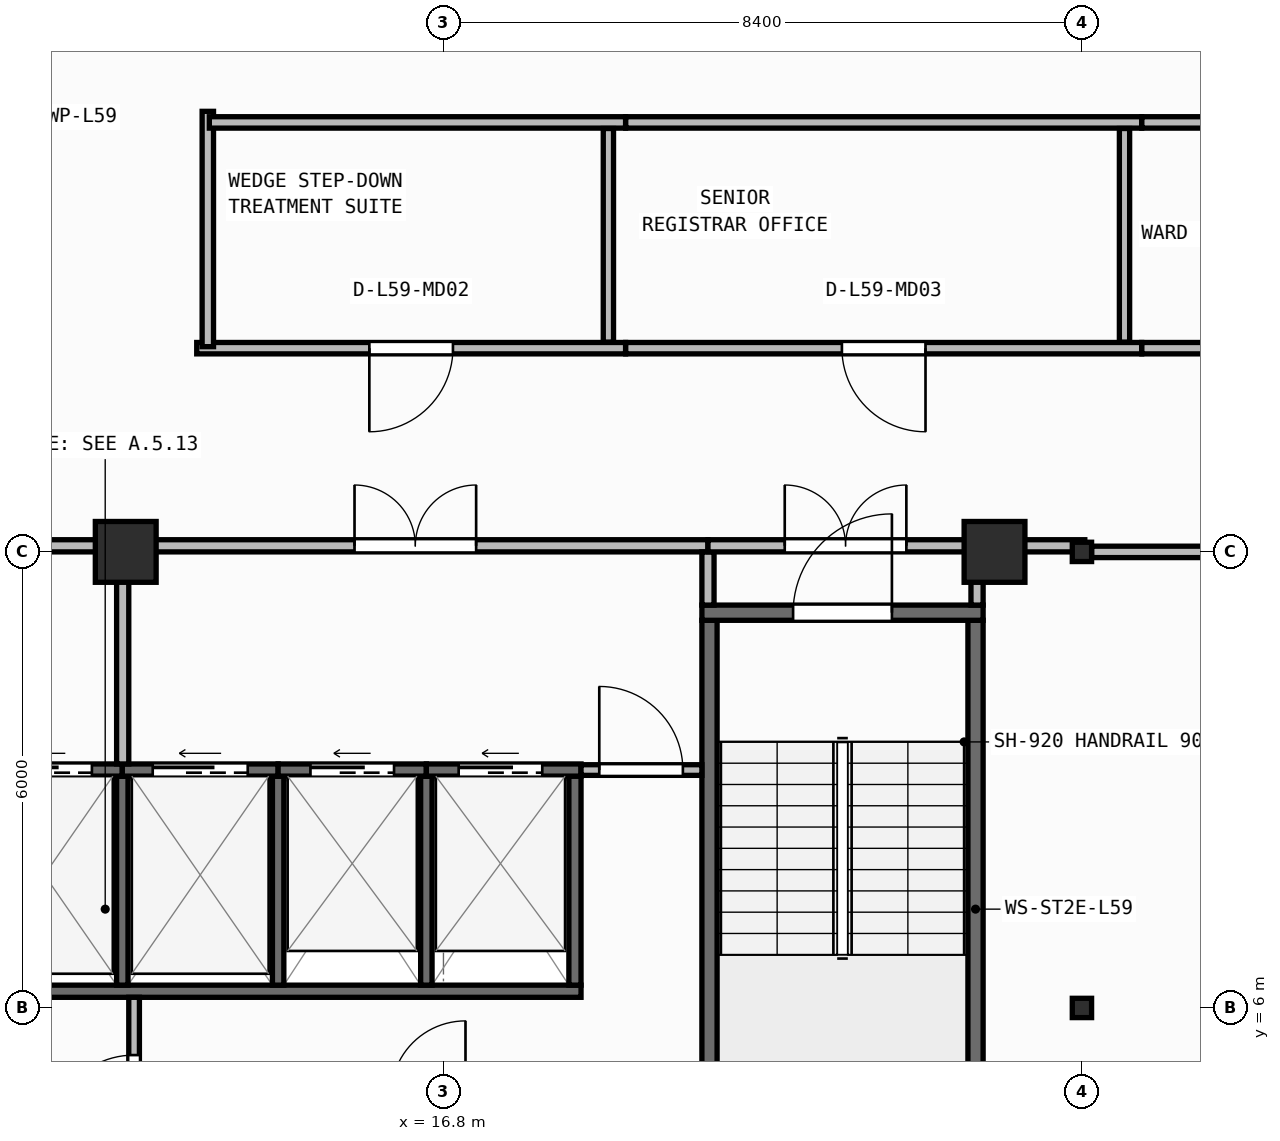
"""IFC4 building model, lengths in metres.
Left out: names, types, materials, properties, quantities, classifications, styles, units other than length and angle.
Written with IfcOpenShell. Run it as: python <this file> out.ifc"""

import sys

from ifc_helpers import new_model, si_unit, direction, frame, frame_2d, origin, origin_2d, place, context, subcontext, project, spatial, rectangle, i_section, extrude, element, fill, save


model = new_model("IFC4")
c1 = context("Model", 3, precision=1e-05, world=origin(), true_north=direction((0.0, 1.0)))
c2 = subcontext(c1, "Body", "Model", "MODEL_VIEW")
j1 = project(units=[si_unit("LENGTHUNIT", "METRE"), si_unit("PLANEANGLEUNIT", "RADIAN")], contexts=[c1])
p1 = place(None, origin())
s1 = spatial("IfcSite", under=j1, at=p1, CompositionType="ELEMENT")
p2 = place(p1, origin())
s2 = spatial("IfcBuilding", under=s1, at=p2, CompositionType="ELEMENT")
p3 = place(p2, frame((0.0, 0.0, 240.75)))
s3 = spatial("IfcBuildingStorey", under=s2, at=p3, CompositionType="ELEMENT", Elevation=240.75)
p4 = place(p3, frame((25.2, 6.0, 0.0), z_axis=(0.0, 0.0, 1.0), x_axis=(1.0, 0.0, 0.0)))
e1 = element("IfcColumn", 1, at=p4, inside=s3, PredefinedType="COLUMN", context=c2, shape_type="SweptSolid", body=[
    extrude(i_section(OverallWidth=0.254, OverallDepth=0.254, WebThickness=0.009, FlangeThickness=0.014, FilletRadius=0.013, at=origin_2d()), origin(), (0.0, 0.0, 1.0), 3.95),
])
for number, where, z_axis, x_axis in (
    (2, (12.62, 12.0, 0.0), (0.0, 0.0, 1.0), (1.0, 0.0, 0.0)),
    (3, (24.05, 12.0, 0.0), (0.0, 0.0, 1.0), (1.0, 0.0, 0.0)),
):
    element("IfcColumn", number, at=place(p3, frame(where, z_axis=z_axis, x_axis=x_axis)), inside=s3, PredefinedType="COLUMN", context=c2, shape_type="SweptSolid", body=[
        extrude(rectangle(XDim=0.8, YDim=0.8, at=origin_2d()), origin(), (0.0, 0.0, 1.0), 3.95),
    ])
p5 = place(p3, frame((25.2, 12.0, 0.0), z_axis=(0.0, 0.0, 1.0), x_axis=(1.0, 0.0, 0.0)))
e4 = element("IfcColumn", 4, at=p5, inside=s3, PredefinedType="COLUMN", context=c2, shape_type="SweptSolid", body=[
    extrude(i_section(OverallWidth=0.254, OverallDepth=0.254, WebThickness=0.009, FlangeThickness=0.014, FilletRadius=0.013, at=origin_2d()), origin(), (0.0, 0.0, 1.0), 3.95),
])
for number, where, z_axis, x_axis in (
    (5, (20.3, 3.5, 0.0), (0.0, 0.0, 1.0), (0.0, 1.0, 0.0)),
    (6, (23.8, 3.5, 0.0), (0.0, 0.0, 1.0), (0.0, 1.0, 0.0)),
):
    element("IfcWall", number, at=place(p3, frame(where, z_axis=z_axis, x_axis=x_axis)), inside=s3, PredefinedType="SHEAR", context=c2, shape_type="SweptSolid", body=[
        extrude(rectangle(XDim=7.6, YDim=0.2, at=frame_2d((3.8, 0.0))), origin(), (0.0, 0.0, 1.0), 3.71),
    ])
p6 = place(p3, frame((20.2, 11.2, 0.0), z_axis=(0.0, 0.0, 1.0), x_axis=(1.0, 0.0, 0.0)))
e7 = element("IfcWall", 7, at=p6, inside=s3, PredefinedType="SHEAR", context=c2, shape_type="SweptSolid", body=[
    extrude(rectangle(XDim=3.7, YDim=0.2, at=frame_2d((1.85, 0.0))), origin(), (0.0, 0.0, 1.0), 3.71),
])
p7 = place(p6, frame((1.2, 0.0, 0.0)))
e8 = element("IfcOpeningElement", 8, at=p7, cuts=e7, PredefinedType="OPENING", context=c2, shape_type="SweptSolid", body=[
    extrude(rectangle(XDim=1.3, YDim=2.15, at=frame_2d((0.65, 1.075))), frame((0.0, 0.11, 0.0), z_axis=(0.0, -1.0, 0.0), x_axis=(1.0, 0.0, 0.0)), (0.0, 0.0, 1.0), 0.22),
])
p8 = place(p3, frame((6.5, 6.22, 0.0), z_axis=(0.0, 0.0, 1.0), x_axis=(1.0, 0.0, 0.0)))
e9 = element("IfcWall", 9, at=p8, inside=s3, PredefinedType="SHEAR", context=c2, shape_type="SweptSolid", body=[
    extrude(rectangle(XDim=12.11, YDim=0.16, at=frame_2d((6.055, 0.0))), origin(), (0.0, 0.0, 1.0), 3.71),
])
p9 = place(p3, frame((18.53, 6.3, 0.0), z_axis=(0.0, 0.0, 1.0), x_axis=(0.0, 1.0, 0.0)))
e10 = element("IfcWall", 10, at=p9, inside=s3, PredefinedType="SHEAR", context=c2, shape_type="SweptSolid", body=[
    extrude(rectangle(XDim=2.75, YDim=0.16, at=frame_2d((1.375, 0.0))), origin(), (0.0, 0.0, 1.0), 3.71),
])
for number, where, z_axis, x_axis in (
    (11, (12.575, 6.3, 0.0), (0.0, 0.0, 1.0), (0.0, 1.0, 0.0)),
    (12, (14.625, 6.3, 0.0), (0.0, 0.0, 1.0), (0.0, 1.0, 0.0)),
    (13, (16.575, 6.3, 0.0), (0.0, 0.0, 1.0), (0.0, 1.0, 0.0)),
):
    element("IfcWall", number, at=place(p3, frame(where, z_axis=z_axis, x_axis=x_axis)), inside=s3, PredefinedType="SHEAR", context=c2, shape_type="SweptSolid", body=[
        extrude(rectangle(XDim=2.75, YDim=0.15, at=frame_2d((1.375, 0.0))), origin(), (0.0, 0.0, 1.0), 3.71),
    ])
p10 = place(p3, frame((10.525, 9.13, 0.0), z_axis=(0.0, 0.0, 1.0), x_axis=(1.0, 0.0, 0.0)))
e14 = element("IfcWall", 14, at=p10, inside=s3, PredefinedType="SHEAR", context=c2, shape_type="SweptSolid", body=[
    extrude(rectangle(XDim=2.05, YDim=0.16, at=frame_2d((1.025, 0.0))), origin(), (0.0, 0.0, 1.0), 3.71),
])
p11 = place(p10, frame((0.4, 0.0, 0.0)))
e15 = element("IfcOpeningElement", 15, at=p11, cuts=e14, PredefinedType="OPENING", context=c2, shape_type="SweptSolid", body=[
    extrude(rectangle(XDim=1.25, YDim=2.15, at=frame_2d((0.625, 1.075))), frame((0.0, 0.09, 0.0), z_axis=(0.0, -1.0, 0.0), x_axis=(1.0, 0.0, 0.0)), (0.0, 0.0, 1.0), 0.18),
])
p12 = place(p3, frame((12.575, 9.13, 0.0), z_axis=(0.0, 0.0, 1.0), x_axis=(1.0, 0.0, 0.0)))
e16 = element("IfcWall", 16, at=p12, inside=s3, PredefinedType="SHEAR", context=c2, shape_type="SweptSolid", body=[
    extrude(rectangle(XDim=2.05, YDim=0.16, at=frame_2d((1.025, 0.0))), origin(), (0.0, 0.0, 1.0), 3.71),
])
p13 = place(p12, frame((0.4, 0.0, 0.0)))
e17 = element("IfcOpeningElement", 17, at=p13, cuts=e16, PredefinedType="OPENING", context=c2, shape_type="SweptSolid", body=[
    extrude(rectangle(XDim=1.25, YDim=2.15, at=frame_2d((0.625, 1.075))), frame((0.0, 0.09, 0.0), z_axis=(0.0, -1.0, 0.0), x_axis=(1.0, 0.0, 0.0)), (0.0, 0.0, 1.0), 0.18),
])
p14 = place(p3, frame((14.625, 9.13, 0.0), z_axis=(0.0, 0.0, 1.0), x_axis=(1.0, 0.0, 0.0)))
e18 = element("IfcWall", 18, at=p14, inside=s3, PredefinedType="SHEAR", context=c2, shape_type="SweptSolid", body=[
    extrude(rectangle(XDim=1.95, YDim=0.16, at=frame_2d((0.975, 0.0))), origin(), (0.0, 0.0, 1.0), 3.71),
])
p15 = place(p14, frame((0.425, 0.0, 0.0)))
e19 = element("IfcOpeningElement", 19, at=p15, cuts=e18, PredefinedType="OPENING", context=c2, shape_type="SweptSolid", body=[
    extrude(rectangle(XDim=1.1, YDim=2.15, at=frame_2d((0.55, 1.075))), frame((0.0, 0.09, 0.0), z_axis=(0.0, -1.0, 0.0), x_axis=(1.0, 0.0, 0.0)), (0.0, 0.0, 1.0), 0.18),
])
p16 = place(p3, frame((16.575, 9.13, 0.0), z_axis=(0.0, 0.0, 1.0), x_axis=(1.0, 0.0, 0.0)))
e20 = element("IfcWall", 20, at=p16, inside=s3, PredefinedType="SHEAR", context=c2, shape_type="SweptSolid", body=[
    extrude(rectangle(XDim=2.035, YDim=0.16, at=frame_2d((1.018, 0.0))), origin(), (0.0, 0.0, 1.0), 3.71),
])
p17 = place(p16, frame((0.425, 0.0, 0.0)))
e21 = element("IfcOpeningElement", 21, at=p17, cuts=e20, PredefinedType="OPENING", context=c2, shape_type="SweptSolid", body=[
    extrude(rectangle(XDim=1.1, YDim=2.15, at=frame_2d((0.55, 1.075))), frame((0.0, 0.09, 0.0), z_axis=(0.0, -1.0, 0.0), x_axis=(1.0, 0.0, 0.0)), (0.0, 0.0, 1.0), 0.18),
])
p18 = place(p3, frame((12.73, 3.52, 0.0), z_axis=(0.0, 0.0, 1.0), x_axis=(0.0, 1.0, 0.0)))
e22 = element("IfcWall", 22, at=p18, inside=s3, PredefinedType="PARTITIONING", context=c2, shape_type="SweptSolid", body=[
    extrude(rectangle(XDim=2.62, YDim=0.14, at=frame_2d((1.31, 0.0))), origin(), (0.0, 0.0, 1.0), 3.71),
])
p19 = place(p18, frame((0.76, 0.0, 0.0)))
e23 = element("IfcOpeningElement", 23, at=p19, cuts=e22, PredefinedType="OPENING", context=c2, shape_type="SweptSolid", body=[
    extrude(rectangle(XDim=1.1, YDim=2.1, at=frame_2d((0.55, 1.05))), frame((0.0, 0.08, 0.0), z_axis=(0.0, -1.0, 0.0), x_axis=(1.0, 0.0, 0.0)), (0.0, 0.0, 1.0), 0.16),
])
p20 = place(p3, frame((18.61, 9.13, 0.0), z_axis=(0.0, 0.0, 1.0), x_axis=(1.0, 0.0, 0.0)))
e24 = element("IfcWall", 24, at=p20, inside=s3, PredefinedType="PARTITIONING", context=c2, shape_type="SweptSolid", body=[
    extrude(rectangle(XDim=1.59, YDim=0.14, at=frame_2d((0.795, 0.0))), origin(), (0.0, 0.0, 1.0), 3.71),
])
p21 = place(p20, frame((0.24, 0.0, 0.0)))
e25 = element("IfcOpeningElement", 25, at=p21, cuts=e24, PredefinedType="OPENING", context=c2, shape_type="SweptSolid", body=[
    extrude(rectangle(XDim=1.1, YDim=2.1, at=frame_2d((0.55, 1.05))), frame((0.0, 0.08, 0.0), z_axis=(0.0, -1.0, 0.0), x_axis=(1.0, 0.0, 0.0)), (0.0, 0.0, 1.0), 0.16),
])
p22 = place(p3, frame((6.4, 12.08, 0.0), z_axis=(0.0, 0.0, 1.0), x_axis=(1.0, 0.0, 0.0)))
e26 = element("IfcWall", 26, at=p22, inside=s3, PredefinedType="PARTITIONING", context=c2, shape_type="SweptSolid", body=[
    extrude(rectangle(XDim=6.18, YDim=0.16, at=frame_2d((3.09, 0.0))), origin(), (0.0, 0.0, 1.0), 3.157),
])
p23 = place(p22, frame((2.29, 0.0, 0.0)))
e27 = element("IfcOpeningElement", 27, at=p23, cuts=e26, PredefinedType="OPENING", context=c2, shape_type="SweptSolid", body=[
    extrude(rectangle(XDim=1.6, YDim=2.05, at=frame_2d((0.8, 1.025))), frame((0.0, 0.09, 0.0), z_axis=(0.0, -1.0, 0.0), x_axis=(1.0, 0.0, 0.0)), (0.0, 0.0, 1.0), 0.18),
])
p24 = place(p3, frame((12.58, 9.21, 0.0), z_axis=(0.0, 0.0, 1.0), x_axis=(0.0, 1.0, 0.0)))
e28 = element("IfcWall", 28, at=p24, inside=s3, PredefinedType="PARTITIONING", context=c2, shape_type="SweptSolid", body=[
    extrude(rectangle(XDim=2.79, YDim=0.16, at=frame_2d((1.395, 0.0))), origin(), (0.0, 0.0, 1.0), 3.71),
])
p25 = place(p3, frame((12.58, 12.08, 0.0), z_axis=(0.0, 0.0, 1.0), x_axis=(1.0, 0.0, 0.0)))
e29 = element("IfcWall", 29, at=p25, inside=s3, PredefinedType="PARTITIONING", context=c2, shape_type="SweptSolid", body=[
    extrude(rectangle(XDim=7.7, YDim=0.16, at=frame_2d((3.85, 0.0))), origin(), (0.0, 0.0, 1.0), 3.157),
])
p26 = place(p25, frame((3.05, 0.0, 0.0)))
e30 = element("IfcOpeningElement", 30, at=p26, cuts=e29, PredefinedType="OPENING", context=c2, shape_type="SweptSolid", body=[
    extrude(rectangle(XDim=1.6, YDim=2.05, at=frame_2d((0.8, 1.025))), frame((0.0, 0.09, 0.0), z_axis=(0.0, -1.0, 0.0), x_axis=(1.0, 0.0, 0.0)), (0.0, 0.0, 1.0), 0.18),
])
p27 = place(p3, frame((20.28, 11.3, 0.0), z_axis=(0.0, 0.0, 1.0), x_axis=(0.0, 1.0, 0.0)))
e31 = element("IfcWall", 31, at=p27, inside=s3, PredefinedType="PARTITIONING", context=c2, shape_type="SweptSolid", body=[
    extrude(rectangle(XDim=0.7, YDim=0.16, at=frame_2d((0.35, 0.0))), origin(), (0.0, 0.0, 1.0), 3.71),
])
p28 = place(p3, frame((20.28, 12.08, 0.0), z_axis=(0.0, 0.0, 1.0), x_axis=(1.0, 0.0, 0.0)))
e32 = element("IfcWall", 32, at=p28, inside=s3, PredefinedType="PARTITIONING", context=c2, shape_type="SweptSolid", body=[
    extrude(rectangle(XDim=3.62, YDim=0.16, at=frame_2d((1.81, 0.0))), origin(), (0.0, 0.0, 1.0), 3.157),
])
p29 = place(p28, frame((1.01, 0.0, 0.0)))
e33 = element("IfcOpeningElement", 33, at=p29, cuts=e32, PredefinedType="OPENING", context=c2, shape_type="SweptSolid", body=[
    extrude(rectangle(XDim=1.6, YDim=2.05, at=frame_2d((0.8, 1.025))), frame((0.0, 0.09, 0.0), z_axis=(0.0, -1.0, 0.0), x_axis=(1.0, 0.0, 0.0)), (0.0, 0.0, 1.0), 0.18),
])
p30 = place(p3, frame((23.82, 11.3, 0.0), z_axis=(0.0, 0.0, 1.0), x_axis=(0.0, 1.0, 0.0)))
e34 = element("IfcWall", 34, at=p30, inside=s3, PredefinedType="PARTITIONING", context=c2, shape_type="SweptSolid", body=[
    extrude(rectangle(XDim=0.7, YDim=0.16, at=frame_2d((0.35, 0.0))), origin(), (0.0, 0.0, 1.0), 3.71),
])
p31 = place(p3, frame((31.35, 12.0, 0.0), z_axis=(0.0, 0.0, 1.0), x_axis=(-1.0, 0.0, 0.0)))
e35 = element("IfcWall", 35, at=p31, inside=s3, PredefinedType="PARTITIONING", context=c2, shape_type="SweptSolid", body=[
    extrude(rectangle(XDim=6.023, YDim=0.15, at=frame_2d((3.012, 0.0))), origin(), (0.0, 0.0, 1.0), 3.157),
])
p32 = place(p31, frame((1.444, 0.0, 0.0)))
e36 = element("IfcOpeningElement", 36, at=p32, cuts=e35, PredefinedType="OPENING", context=c2, shape_type="SweptSolid", body=[
    extrude(rectangle(XDim=1.1, YDim=2.1, at=frame_2d((0.55, 1.05))), frame((0.0, 0.085, 0.0), z_axis=(0.0, -1.0, 0.0), x_axis=(1.0, 0.0, 0.0)), (0.0, 0.0, 1.0), 0.17),
])
p33 = place(p3, frame((19.196, 14.68, 0.0), z_axis=(0.0, 0.0, 1.0), x_axis=(-1.0, 0.0, 0.0)))
e37 = element("IfcWall", 37, at=p33, inside=s3, PredefinedType="PARTITIONING", context=c2, shape_type="SweptSolid", body=[
    extrude(rectangle(XDim=5.642, YDim=0.15, at=frame_2d((2.821, 0.0))), origin(), (0.0, 0.0, 1.0), 3.71),
])
p34 = place(p33, frame((2.271, 0.0, 0.0)))
e38 = element("IfcOpeningElement", 38, at=p34, cuts=e37, PredefinedType="OPENING", context=c2, shape_type="SweptSolid", body=[
    extrude(rectangle(XDim=1.1, YDim=2.1, at=frame_2d((0.55, 1.05))), frame((0.0, 0.085, 0.0), z_axis=(0.0, -1.0, 0.0), x_axis=(1.0, 0.0, 0.0)), (0.0, 0.0, 1.0), 0.17),
])
p35 = place(p3, frame((25.986, 14.68, 0.0), z_axis=(0.0, 0.0, 1.0), x_axis=(-1.0, 0.0, 0.0)))
e39 = element("IfcWall", 39, at=p35, inside=s3, PredefinedType="PARTITIONING", context=c2, shape_type="SweptSolid", body=[
    extrude(rectangle(XDim=6.788, YDim=0.15, at=frame_2d((3.394, 0.0))), origin(), (0.0, 0.0, 1.0), 3.71),
])
p36 = place(p35, frame((2.844, 0.0, 0.0)))
e40 = element("IfcOpeningElement", 40, at=p36, cuts=e39, PredefinedType="OPENING", context=c2, shape_type="SweptSolid", body=[
    extrude(rectangle(XDim=1.1, YDim=2.1, at=frame_2d((0.55, 1.05))), frame((0.0, 0.085, 0.0), z_axis=(0.0, -1.0, 0.0), x_axis=(1.0, 0.0, 0.0)), (0.0, 0.0, 1.0), 0.17),
])
p37 = place(p3, frame((35.286, 14.68, 0.0), z_axis=(0.0, 0.0, 1.0), x_axis=(-1.0, 0.0, 0.0)))
e41 = element("IfcWall", 41, at=p37, inside=s3, PredefinedType="PARTITIONING", context=c2, shape_type="SweptSolid", body=[
    extrude(rectangle(XDim=9.298, YDim=0.15, at=frame_2d((4.649, 0.0))), origin(), (0.0, 0.0, 1.0), 3.71),
])
p38 = place(p37, frame((4.099, 0.0, 0.0)))
e42 = element("IfcOpeningElement", 42, at=p38, cuts=e41, PredefinedType="OPENING", context=c2, shape_type="SweptSolid", body=[
    extrude(rectangle(XDim=1.1, YDim=2.1, at=frame_2d((0.55, 1.05))), frame((0.0, 0.085, 0.0), z_axis=(0.0, -1.0, 0.0), x_axis=(1.0, 0.0, 0.0)), (0.0, 0.0, 1.0), 0.17),
])
p39 = place(p3, frame((13.7, 14.7, 0.0), z_axis=(0.0, 0.0, 1.0), x_axis=(0.0, 1.0, 0.0)))
e43 = element("IfcWall", 43, at=p39, inside=s3, PredefinedType="PARTITIONING", context=c2, shape_type="SweptSolid", body=[
    extrude(rectangle(XDim=3.096, YDim=0.15, at=frame_2d((1.548, 0.0))), origin(), (0.0, 0.0, 1.0), 3.71),
])
p40 = place(p3, frame((13.72, 17.65, 0.0), z_axis=(0.0, 0.0, 1.0), x_axis=(1.0, 0.0, 0.0)))
e44 = element("IfcWall", 44, at=p40, inside=s3, PredefinedType="PARTITIONING", context=c2, shape_type="SweptSolid", body=[
    extrude(rectangle(XDim=5.476, YDim=0.15, at=frame_2d((2.738, 0.0))), origin(), (0.0, 0.0, 1.0), 3.71),
])
p41 = place(p3, frame((19.198, 17.65, 0.0), z_axis=(0.0, 0.0, 1.0), x_axis=(1.0, 0.0, 0.0)))
e45 = element("IfcWall", 45, at=p41, inside=s3, PredefinedType="PARTITIONING", context=c2, shape_type="SweptSolid", body=[
    extrude(rectangle(XDim=6.788, YDim=0.15, at=frame_2d((3.394, 0.0))), origin(), (0.0, 0.0, 1.0), 3.71),
])
p42 = place(p3, frame((25.988, 17.65, 0.0), z_axis=(0.0, 0.0, 1.0), x_axis=(1.0, 0.0, 0.0)))
e46 = element("IfcWall", 46, at=p42, inside=s3, PredefinedType="PARTITIONING", context=c2, shape_type="SweptSolid", body=[
    extrude(rectangle(XDim=9.298, YDim=0.15, at=frame_2d((4.649, 0.0))), origin(), (0.0, 0.0, 1.0), 3.71),
])
for number, where, z_axis, x_axis in (
    (47, (18.97, 14.76, 0.0), (0.0, 0.0, 1.0), (0.0, 1.0, 0.0)),
    (48, (25.76, 14.76, 0.0), (0.0, 0.0, 1.0), (0.0, 1.0, 0.0)),
):
    element("IfcWall", number, at=place(p3, frame(where, z_axis=z_axis, x_axis=x_axis)), inside=s3, PredefinedType="PARTITIONING", context=c2, shape_type="SweptSolid", body=[
        extrude(rectangle(XDim=2.81, YDim=0.135, at=frame_2d((1.405, 0.0))), origin(), (0.0, 0.0, 1.0), 3.71),
    ])
p43 = place(p3, frame((24.02, 12.08, 0.0), z_axis=(0.0, 0.0, 1.0), x_axis=(1.0, 0.0, 0.0)))
e49 = element("IfcWall", 49, at=p43, inside=s3, PredefinedType="PARTITIONING", context=c2, shape_type="SweptSolid", body=[
    extrude(rectangle(XDim=1.218, YDim=0.16, at=frame_2d((0.609, 0.0))), origin(), (0.0, 0.0, 1.0), 3.157),
])
p44 = place(p7, origin())
e50 = element("IfcDoor", 50, at=p44, inside=s3, OperationType="SINGLE_SWING_RIGHT", PredefinedType="DOOR", context=c2, shape_type="SweptSolid", body=[
    extrude(rectangle(XDim=1.3, YDim=2.15, at=frame_2d((0.65, 1.075))), frame((0.0, 0.025, 0.0), z_axis=(0.0, -1.0, 0.0), x_axis=(1.0, 0.0, 0.0)), (0.0, 0.0, 1.0), 0.05),
])
fill(e8, e50)
p45 = place(p11, origin())
e51 = element("IfcDoor", 51, at=p45, inside=s3, OperationType="SLIDING_TO_LEFT", PredefinedType="DOOR", context=c2, shape_type="SweptSolid", body=[
    extrude(rectangle(XDim=1.25, YDim=2.15, at=frame_2d((0.625, 1.075))), frame((0.0, 0.025, 0.0), z_axis=(0.0, -1.0, 0.0), x_axis=(1.0, 0.0, 0.0)), (0.0, 0.0, 1.0), 0.05),
])
fill(e15, e51)
p46 = place(p13, origin())
e52 = element("IfcDoor", 52, at=p46, inside=s3, OperationType="SLIDING_TO_LEFT", PredefinedType="DOOR", context=c2, shape_type="SweptSolid", body=[
    extrude(rectangle(XDim=1.25, YDim=2.15, at=frame_2d((0.625, 1.075))), frame((0.0, 0.025, 0.0), z_axis=(0.0, -1.0, 0.0), x_axis=(1.0, 0.0, 0.0)), (0.0, 0.0, 1.0), 0.05),
])
fill(e17, e52)
p47 = place(p15, origin())
e53 = element("IfcDoor", 53, at=p47, inside=s3, OperationType="SLIDING_TO_LEFT", PredefinedType="DOOR", context=c2, shape_type="SweptSolid", body=[
    extrude(rectangle(XDim=1.1, YDim=2.15, at=frame_2d((0.55, 1.075))), frame((0.0, 0.025, 0.0), z_axis=(0.0, -1.0, 0.0), x_axis=(1.0, 0.0, 0.0)), (0.0, 0.0, 1.0), 0.05),
])
fill(e19, e53)
p48 = place(p17, origin())
e54 = element("IfcDoor", 54, at=p48, inside=s3, OperationType="SLIDING_TO_LEFT", PredefinedType="DOOR", context=c2, shape_type="SweptSolid", body=[
    extrude(rectangle(XDim=1.1, YDim=2.15, at=frame_2d((0.55, 1.075))), frame((0.0, 0.025, 0.0), z_axis=(0.0, -1.0, 0.0), x_axis=(1.0, 0.0, 0.0)), (0.0, 0.0, 1.0), 0.05),
])
fill(e21, e54)
p49 = place(p19, origin())
e55 = element("IfcDoor", 55, at=p49, inside=s3, OperationType="SINGLE_SWING_LEFT", PredefinedType="DOOR", context=c2, shape_type="SweptSolid", body=[
    extrude(rectangle(XDim=1.1, YDim=2.1, at=frame_2d((0.55, 1.05))), frame((0.0, 0.025, 0.0), z_axis=(0.0, -1.0, 0.0), x_axis=(1.0, 0.0, 0.0)), (0.0, 0.0, 1.0), 0.05),
])
fill(e23, e55)
p50 = place(p21, origin())
e56 = element("IfcDoor", 56, at=p50, inside=s3, OperationType="SINGLE_SWING_LEFT", PredefinedType="DOOR", context=c2, shape_type="SweptSolid", body=[
    extrude(rectangle(XDim=1.1, YDim=2.1, at=frame_2d((0.55, 1.05))), frame((0.0, 0.025, 0.0), z_axis=(0.0, -1.0, 0.0), x_axis=(1.0, 0.0, 0.0)), (0.0, 0.0, 1.0), 0.05),
])
fill(e25, e56)
p51 = place(p26, origin())
e57 = element("IfcDoor", 57, at=p51, inside=s3, OperationType="DOUBLE_DOOR_SINGLE_SWING", PredefinedType="DOOR", context=c2, shape_type="SweptSolid", body=[
    extrude(rectangle(XDim=1.6, YDim=2.05, at=frame_2d((0.8, 1.025))), frame((0.0, 0.025, 0.0), z_axis=(0.0, -1.0, 0.0), x_axis=(1.0, 0.0, 0.0)), (0.0, 0.0, 1.0), 0.05),
])
fill(e30, e57)
p52 = place(p29, origin())
e58 = element("IfcDoor", 58, at=p52, inside=s3, OperationType="DOUBLE_DOOR_SINGLE_SWING", PredefinedType="DOOR", context=c2, shape_type="SweptSolid", body=[
    extrude(rectangle(XDim=1.6, YDim=2.05, at=frame_2d((0.8, 1.025))), frame((0.0, 0.025, 0.0), z_axis=(0.0, -1.0, 0.0), x_axis=(1.0, 0.0, 0.0)), (0.0, 0.0, 1.0), 0.05),
])
fill(e33, e58)
p53 = place(p34, origin())
e59 = element("IfcDoor", 59, at=p53, inside=s3, OperationType="SINGLE_SWING_RIGHT", PredefinedType="DOOR", context=c2, shape_type="SweptSolid", body=[
    extrude(rectangle(XDim=1.1, YDim=2.1, at=frame_2d((0.55, 1.05))), frame((0.0, 0.025, 0.0), z_axis=(0.0, -1.0, 0.0), x_axis=(1.0, 0.0, 0.0)), (0.0, 0.0, 1.0), 0.05),
])
fill(e38, e59)
p54 = place(p36, origin())
e60 = element("IfcDoor", 60, at=p54, inside=s3, OperationType="SINGLE_SWING_LEFT", PredefinedType="DOOR", context=c2, shape_type="SweptSolid", body=[
    extrude(rectangle(XDim=1.1, YDim=2.1, at=frame_2d((0.55, 1.05))), frame((0.0, 0.025, 0.0), z_axis=(0.0, -1.0, 0.0), x_axis=(1.0, 0.0, 0.0)), (0.0, 0.0, 1.0), 0.05),
])
fill(e40, e60)
save(model, sys.argv[1])
